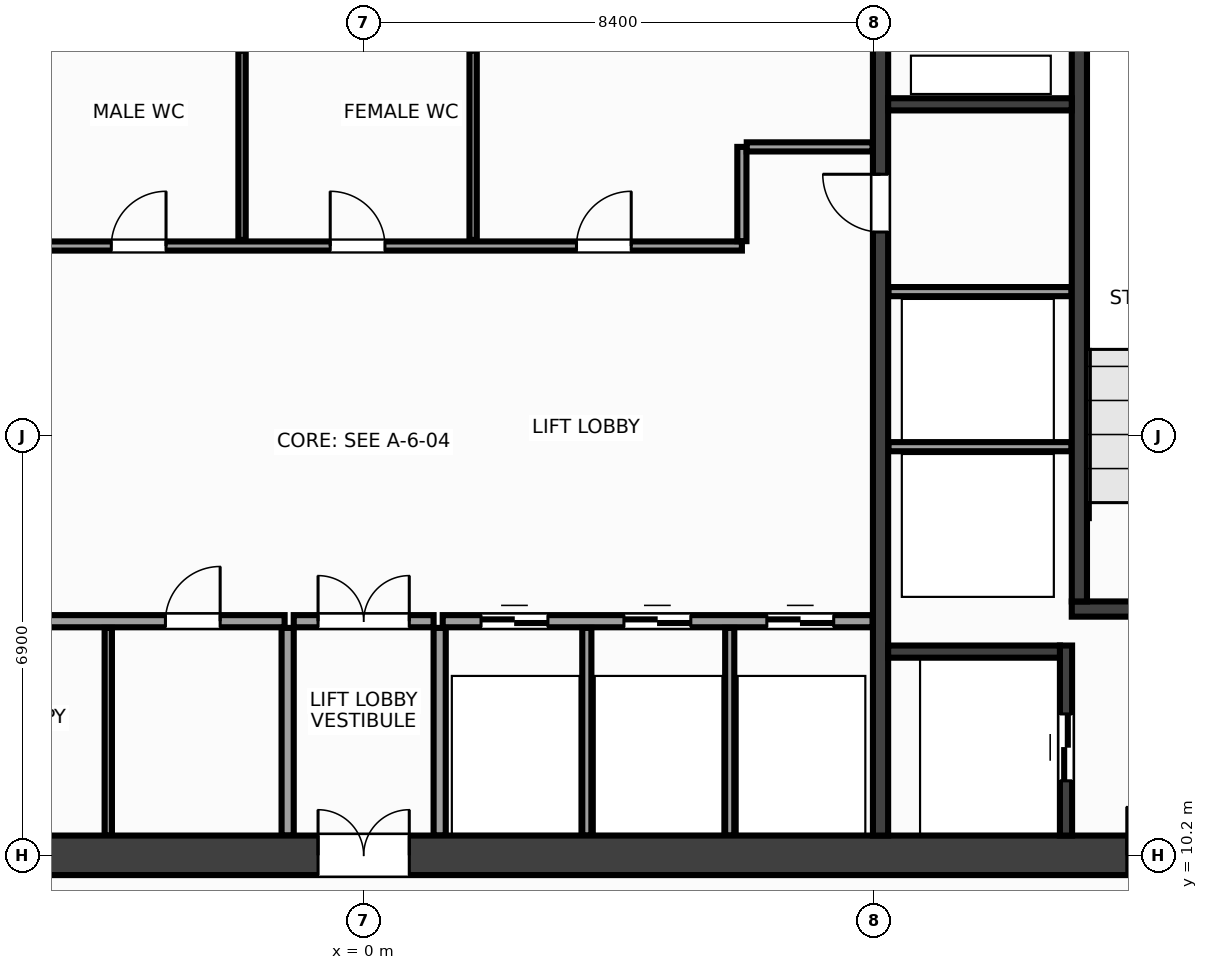
"""IFC4 building model, lengths in metres.
Left out: names, types, materials, properties, quantities, classifications, styles, units other than length and angle.
Written with IfcOpenShell. Run it as: python <this file> out.ifc"""

import sys

from ifc_helpers import new_model, si_unit, direction, frame, frame_2d, origin, place, context, subcontext, project, spatial, rectangle, extrude, source, transform, mapped, element, fill, save


model = new_model("IFC4")
c1 = context("Model", 3, precision=1e-05, world=origin(), true_north=direction((0.0, 1.0)))
c2 = subcontext(c1, "Body", "Model", "MODEL_VIEW")
j1 = project(units=[si_unit("LENGTHUNIT", "METRE"), si_unit("PLANEANGLEUNIT", "RADIAN")], contexts=[c1])
p1 = place(None, origin())
s1 = spatial("IfcSite", under=j1, at=p1, CompositionType="ELEMENT")
p2 = place(p1, origin())
s2 = spatial("IfcBuilding", under=s1, at=p2, CompositionType="ELEMENT")
p3 = place(p2, frame((0.0, 0.0, 113.6)))
s3 = spatial("IfcBuildingStorey", under=s2, at=p3, CompositionType="ELEMENT", Elevation=113.6)
m1 = source(origin(), c2, "Body", "SweptSolid", [
    extrude(rectangle(XDim=31.85, YDim=0.65, at=frame_2d((15.925, 0.0))), origin(), (0.0, 0.0, 1.0), 3.6),
])
p4 = place(p3, frame((-15.925, 10.2, 0.0), z_axis=(0.0, 0.0, 1.0), x_axis=(1.0, 0.0, 0.0)))
e1 = element("IfcWall", 1, at=p4, inside=s3, PredefinedType="SHEAR", context=c2, shape_type="MappedRepresentation", body=[
    mapped(m1, transform((0.0, 0.0, 0.0), x_axis=(1.0, 0.0, 0.0), y_axis=(0.0, 1.0, 0.0), z_axis=(0.0, 0.0, 1.0), scale=1.0)),
])
p5 = place(p4, frame((1.775, 0.0, 0.0)))
e2 = element("IfcOpeningElement", 2, at=p5, cuts=e1, PredefinedType="OPENING", context=c2, shape_type="SweptSolid", body=[
    extrude(rectangle(XDim=1.6, YDim=2.15, at=frame_2d((0.8, 1.075))), frame((0.0, 0.337, 0.0), z_axis=(0.0, -1.0, 0.0), x_axis=(1.0, 0.0, 0.0)), (0.0, 0.0, 1.0), 0.674),
])
p6 = place(p4, frame((28.475, 0.0, 0.0)))
e3 = element("IfcOpeningElement", 3, at=p6, cuts=e1, PredefinedType="OPENING", context=c2, shape_type="SweptSolid", body=[
    extrude(rectangle(XDim=1.6, YDim=2.15, at=frame_2d((0.8, 1.075))), frame((0.0, 0.337, 0.0), z_axis=(0.0, -1.0, 0.0), x_axis=(1.0, 0.0, 0.0)), (0.0, 0.0, 1.0), 0.674),
])
p7 = place(p4, frame((15.175, 0.0, 0.0)))
e4 = element("IfcOpeningElement", 4, at=p7, cuts=e1, PredefinedType="OPENING", context=c2, shape_type="SweptSolid", body=[
    extrude(rectangle(XDim=1.5, YDim=2.2, at=frame_2d((0.75, 1.1))), frame((0.0, 0.337, 0.0), z_axis=(0.0, -1.0, 0.0), x_axis=(1.0, 0.0, 0.0)), (0.0, 0.0, 1.0), 0.674),
])
m2 = source(origin(), c2, "Body", "SweptSolid", [
    extrude(rectangle(XDim=12.95, YDim=0.25, at=frame_2d((6.475, 0.0))), origin(), (0.0, 0.0, 1.0), 3.6),
])
p8 = place(p3, frame((8.5, 10.525, 0.0), z_axis=(0.0, 0.0, 1.0), x_axis=(0.0, 1.0, 0.0)))
e5 = element("IfcWall", 5, at=p8, inside=s3, PredefinedType="SHEAR", context=c2, shape_type="MappedRepresentation", body=[
    mapped(m2, transform((0.0, 0.0, 0.0), x_axis=(1.0, 0.0, 0.0), y_axis=(0.0, 1.0, 0.0), z_axis=(0.0, 0.0, 1.0), scale=1.0)),
])
p9 = place(p8, frame((9.925, 0.0, 0.0)))
e6 = element("IfcOpeningElement", 6, at=p9, cuts=e5, PredefinedType="OPENING", context=c2, shape_type="SweptSolid", body=[
    extrude(rectangle(XDim=0.95, YDim=2.15, at=frame_2d((0.475, 1.075))), frame((0.0, 0.137, 0.0), z_axis=(0.0, -1.0, 0.0), x_axis=(1.0, 0.0, 0.0)), (0.0, 0.0, 1.0), 0.274),
])
m3 = source(origin(), c2, "Body", "SweptSolid", [
    extrude(rectangle(XDim=3.63, YDim=0.25, at=frame_2d((1.815, 0.0))), origin(), (0.0, 0.0, 1.0), 3.6),
])
p10 = place(p3, frame((11.645, 14.25, 0.0), z_axis=(0.0, 0.0, 1.0), x_axis=(1.0, 0.0, 0.0)))
e7 = element("IfcWall", 7, at=p10, inside=s3, PredefinedType="SHEAR", context=c2, shape_type="MappedRepresentation", body=[
    mapped(m3, transform((0.0, 0.0, 0.0), x_axis=(1.0, 0.0, 0.0), y_axis=(0.0, 1.0, 0.0), z_axis=(0.0, 0.0, 1.0), scale=1.0)),
])
p11 = place(p10, frame((0.95, 0.0, 0.0)))
e8 = element("IfcOpeningElement", 8, at=p11, cuts=e7, PredefinedType="OPENING", context=c2, shape_type="SweptSolid", body=[
    extrude(rectangle(XDim=1.6, YDim=2.15, at=frame_2d((0.8, 1.075))), frame((0.0, 0.137, 0.0), z_axis=(0.0, -1.0, 0.0), x_axis=(1.0, 0.0, 0.0)), (0.0, 0.0, 1.0), 0.274),
])
m4 = source(origin(), c2, "Body", "SweptSolid", [
    extrude(rectangle(XDim=9.1, YDim=0.25, at=frame_2d((4.55, 0.0))), origin(), (0.0, 0.0, 1.0), 3.6),
])
p12 = place(p3, frame((11.77, 14.375, 0.0), z_axis=(0.0, 0.0, 1.0), x_axis=(0.0, 1.0, 0.0)))
e9 = element("IfcWall", 9, at=p12, inside=s3, PredefinedType="SHEAR", context=c2, shape_type="MappedRepresentation", body=[
    mapped(m4, transform((0.0, 0.0, 0.0), x_axis=(1.0, 0.0, 0.0), y_axis=(0.0, 1.0, 0.0), z_axis=(0.0, 0.0, 1.0), scale=1.0)),
])
m5 = source(origin(), c2, "Body", "SweptSolid", [
    extrude(rectangle(XDim=3.125, YDim=0.2, at=frame_2d((1.562, 0.0))), origin(), (0.0, 0.0, 1.0), 3.6),
])
p13 = place(p3, frame((11.55, 10.525, 0.0), z_axis=(0.0, 0.0, 1.0), x_axis=(0.0, 1.0, 0.0)))
e10 = element("IfcWall", 10, at=p13, inside=s3, PredefinedType="SHEAR", context=c2, shape_type="MappedRepresentation", body=[
    mapped(m5, transform((0.0, 0.0, 0.0), x_axis=(1.0, 0.0, 0.0), y_axis=(0.0, 1.0, 0.0), z_axis=(0.0, 0.0, 1.0), scale=1.0)),
])
p14 = place(p13, frame((0.9, 0.0, 0.0)))
e11 = element("IfcOpeningElement", 11, at=p14, cuts=e10, PredefinedType="OPENING", context=c2, shape_type="SweptSolid", body=[
    extrude(rectangle(XDim=1.1, YDim=2.15, at=frame_2d((0.55, 1.075))), frame((0.0, 0.112, 0.0), z_axis=(0.0, -1.0, 0.0), x_axis=(1.0, 0.0, 0.0)), (0.0, 0.0, 1.0), 0.224),
])
m6 = source(origin(), c2, "Body", "SweptSolid", [
    extrude(rectangle(XDim=2.825, YDim=0.2, at=frame_2d((1.413, 0.0))), origin(), (0.0, 0.0, 1.0), 3.6),
])
p15 = place(p3, frame((8.625, 13.55, 0.0), z_axis=(0.0, 0.0, 1.0), x_axis=(1.0, 0.0, 0.0)))
e12 = element("IfcWall", 12, at=p15, inside=s3, PredefinedType="SHEAR", context=c2, shape_type="MappedRepresentation", body=[
    mapped(m6, transform((0.0, 0.0, 0.0), x_axis=(1.0, 0.0, 0.0), y_axis=(0.0, 1.0, 0.0), z_axis=(0.0, 0.0, 1.0), scale=1.0)),
])
m7 = source(origin(), c2, "Body", "SweptSolid", [
    extrude(rectangle(XDim=3.02, YDim=0.2, at=frame_2d((1.51, 0.0))), origin(), (0.0, 0.0, 1.0), 3.6),
])
p16 = place(p3, frame((8.625, 22.55, 0.0), z_axis=(0.0, 0.0, 1.0), x_axis=(1.0, 0.0, 0.0)))
e13 = element("IfcWall", 13, at=p16, inside=s3, PredefinedType="SHEAR", context=c2, shape_type="MappedRepresentation", body=[
    mapped(m7, transform((0.0, 0.0, 0.0), x_axis=(1.0, 0.0, 0.0), y_axis=(0.0, 1.0, 0.0), z_axis=(0.0, 0.0, 1.0), scale=1.0)),
])
m8 = source(origin(), c2, "Body", "SweptSolid", [
    extrude(rectangle(XDim=3.01, YDim=0.15, at=frame_2d((1.505, 0.0))), origin(), (0.0, 0.0, 1.0), 3.36),
])
for number, where, z_axis, x_axis in (
    (14, (8.63, 16.92, 0.0), (0.0, 0.0, 1.0), (1.0, 0.0, 0.0)),
    (15, (8.63, 19.47, 0.0), (0.0, 0.0, 1.0), (1.0, 0.0, 0.0)),
):
    element("IfcWall", number, at=place(p3, frame(where, z_axis=z_axis, x_axis=x_axis)), inside=s3, PredefinedType="PARTITIONING", context=c2, shape_type="MappedRepresentation", body=[
        mapped(m8, transform((0.0, 0.0, 0.0), x_axis=(1.0, 0.0, 0.0), y_axis=(0.0, 1.0, 0.0), z_axis=(0.0, 0.0, 1.0), scale=1.0)),
    ])
m9 = source(origin(), c2, "Body", "SweptSolid", [
    extrude(rectangle(XDim=7.07, YDim=0.2, at=frame_2d((3.535, 0.0))), origin(), (0.0, 0.0, 1.0), 3.36),
])
p17 = place(p3, frame((-8.37, 14.05, 0.0), z_axis=(0.0, 0.0, 1.0), x_axis=(1.0, 0.0, 0.0)))
e16 = element("IfcWall", 16, at=p17, inside=s3, PredefinedType="PARTITIONING", context=c2, shape_type="MappedRepresentation", body=[
    mapped(m9, transform((0.0, 0.0, 0.0), x_axis=(1.0, 0.0, 0.0), y_axis=(0.0, 1.0, 0.0), z_axis=(0.0, 0.0, 1.0), scale=1.0)),
])
p18 = place(p17, frame((1.66, 0.0, 0.0)))
e17 = element("IfcOpeningElement", 17, at=p18, cuts=e16, PredefinedType="OPENING", context=c2, shape_type="SweptSolid", body=[
    extrude(rectangle(XDim=0.9, YDim=2.15, at=frame_2d((0.45, 1.075))), frame((0.0, 0.112, 0.0), z_axis=(0.0, -1.0, 0.0), x_axis=(1.0, 0.0, 0.0)), (0.0, 0.0, 1.0), 0.224),
])
p19 = place(p17, frame((5.11, 0.0, 0.0)))
e18 = element("IfcOpeningElement", 18, at=p19, cuts=e16, PredefinedType="OPENING", context=c2, shape_type="SweptSolid", body=[
    extrude(rectangle(XDim=0.9, YDim=2.15, at=frame_2d((0.45, 1.075))), frame((0.0, 0.112, 0.0), z_axis=(0.0, -1.0, 0.0), x_axis=(1.0, 0.0, 0.0)), (0.0, 0.0, 1.0), 0.224),
])
p20 = place(p3, frame((1.3, 14.05, 0.0), z_axis=(0.0, 0.0, 1.0), x_axis=(1.0, 0.0, 0.0)))
e19 = element("IfcWall", 19, at=p20, inside=s3, PredefinedType="PARTITIONING", context=c2, shape_type="MappedRepresentation", body=[
    mapped(m9, transform((0.0, 0.0, 0.0), x_axis=(1.0, 0.0, 0.0), y_axis=(0.0, 1.0, 0.0), z_axis=(0.0, 0.0, 1.0), scale=1.0)),
])
p21 = place(p20, frame((0.63, 0.0, 0.0)))
e20 = element("IfcOpeningElement", 20, at=p21, cuts=e19, PredefinedType="OPENING", context=c2, shape_type="SweptSolid", body=[
    extrude(rectangle(XDim=1.1, YDim=2.15, at=frame_2d((0.55, 1.075))), frame((0.0, 0.112, 0.0), z_axis=(0.0, -1.0, 0.0), x_axis=(1.0, 0.0, 0.0)), (0.0, 0.0, 1.0), 0.224),
])
p22 = place(p20, frame((2.98, 0.0, 0.0)))
e21 = element("IfcOpeningElement", 21, at=p22, cuts=e19, PredefinedType="OPENING", context=c2, shape_type="SweptSolid", body=[
    extrude(rectangle(XDim=1.1, YDim=2.15, at=frame_2d((0.55, 1.075))), frame((0.0, 0.112, 0.0), z_axis=(0.0, -1.0, 0.0), x_axis=(1.0, 0.0, 0.0)), (0.0, 0.0, 1.0), 0.224),
])
p23 = place(p20, frame((5.33, 0.0, 0.0)))
e22 = element("IfcOpeningElement", 22, at=p23, cuts=e19, PredefinedType="OPENING", context=c2, shape_type="SweptSolid", body=[
    extrude(rectangle(XDim=1.1, YDim=2.15, at=frame_2d((0.55, 1.075))), frame((0.0, 0.112, 0.0), z_axis=(0.0, -1.0, 0.0), x_axis=(1.0, 0.0, 0.0)), (0.0, 0.0, 1.0), 0.224),
])
m10 = source(origin(), c2, "Body", "SweptSolid", [
    extrude(rectangle(XDim=3.415, YDim=0.2, at=frame_2d((1.708, 0.0))), origin(), (0.0, 0.0, 1.0), 3.36),
])
for number, where, z_axis, x_axis in (
    (23, (-1.25, 10.525, 0.0), (0.0, 0.0, 1.0), (0.0, 1.0, 0.0)),
    (24, (1.25, 10.525, 0.0), (0.0, 0.0, 1.0), (0.0, 1.0, 0.0)),
):
    element("IfcWall", number, at=place(p3, frame(where, z_axis=z_axis, x_axis=x_axis)), inside=s3, PredefinedType="PARTITIONING", context=c2, shape_type="MappedRepresentation", body=[
        mapped(m10, transform((0.0, 0.0, 0.0), x_axis=(1.0, 0.0, 0.0), y_axis=(0.0, 1.0, 0.0), z_axis=(0.0, 0.0, 1.0), scale=1.0)),
    ])
m11 = source(origin(), c2, "Body", "SweptSolid", [
    extrude(rectangle(XDim=2.3, YDim=0.2, at=frame_2d((1.15, 0.0))), origin(), (0.0, 0.0, 1.0), 3.36),
])
p24 = place(p3, frame((-1.15, 14.05, 0.0), z_axis=(0.0, 0.0, 1.0), x_axis=(1.0, 0.0, 0.0)))
e25 = element("IfcWall", 25, at=p24, inside=s3, PredefinedType="PARTITIONING", context=c2, shape_type="MappedRepresentation", body=[
    mapped(m11, transform((0.0, 0.0, 0.0), x_axis=(1.0, 0.0, 0.0), y_axis=(0.0, 1.0, 0.0), z_axis=(0.0, 0.0, 1.0), scale=1.0)),
])
p25 = place(p24, frame((0.4, 0.0, 0.0)))
e26 = element("IfcOpeningElement", 26, at=p25, cuts=e25, PredefinedType="OPENING", context=c2, shape_type="SweptSolid", body=[
    extrude(rectangle(XDim=1.5, YDim=2.2, at=frame_2d((0.75, 1.1))), frame((0.0, 0.112, 0.0), z_axis=(0.0, -1.0, 0.0), x_axis=(1.0, 0.0, 0.0)), (0.0, 0.0, 1.0), 0.224),
])
m12 = source(origin(), c2, "Body", "SweptSolid", [
    extrude(rectangle(XDim=14.59, YDim=0.15, at=frame_2d((7.295, 0.0))), origin(), (0.0, 0.0, 1.0), 3.36),
])
p26 = place(p3, frame((-8.37, 20.22, 0.0), z_axis=(0.0, 0.0, 1.0), x_axis=(1.0, 0.0, 0.0)))
e27 = element("IfcWall", 27, at=p26, inside=s3, PredefinedType="PARTITIONING", context=c2, shape_type="MappedRepresentation", body=[
    mapped(m12, transform((0.0, 0.0, 0.0), x_axis=(1.0, 0.0, 0.0), y_axis=(0.0, 1.0, 0.0), z_axis=(0.0, 0.0, 1.0), scale=1.0)),
])
p27 = place(p26, frame((1.06, 0.0, 0.0)))
e28 = element("IfcOpeningElement", 28, at=p27, cuts=e27, PredefinedType="OPENING", context=c2, shape_type="SweptSolid", body=[
    extrude(rectangle(XDim=0.9, YDim=2.15, at=frame_2d((0.45, 1.075))), frame((0.0, 0.087, 0.0), z_axis=(0.0, -1.0, 0.0), x_axis=(1.0, 0.0, 0.0)), (0.0, 0.0, 1.0), 0.174),
])
p28 = place(p26, frame((4.22, 0.0, 0.0)))
e29 = element("IfcOpeningElement", 29, at=p28, cuts=e27, PredefinedType="OPENING", context=c2, shape_type="SweptSolid", body=[
    extrude(rectangle(XDim=0.9, YDim=2.15, at=frame_2d((0.45, 1.075))), frame((0.0, 0.087, 0.0), z_axis=(0.0, -1.0, 0.0), x_axis=(1.0, 0.0, 0.0)), (0.0, 0.0, 1.0), 0.174),
])
p29 = place(p26, frame((7.82, 0.0, 0.0)))
e30 = element("IfcOpeningElement", 30, at=p29, cuts=e27, PredefinedType="OPENING", context=c2, shape_type="SweptSolid", body=[
    extrude(rectangle(XDim=0.9, YDim=2.15, at=frame_2d((0.45, 1.075))), frame((0.0, 0.087, 0.0), z_axis=(0.0, -1.0, 0.0), x_axis=(1.0, 0.0, 0.0)), (0.0, 0.0, 1.0), 0.174),
])
p30 = place(p26, frame((11.87, 0.0, 0.0)))
e31 = element("IfcOpeningElement", 31, at=p30, cuts=e27, PredefinedType="OPENING", context=c2, shape_type="SweptSolid", body=[
    extrude(rectangle(XDim=0.9, YDim=2.15, at=frame_2d((0.45, 1.075))), frame((0.0, 0.087, 0.0), z_axis=(0.0, -1.0, 0.0), x_axis=(1.0, 0.0, 0.0)), (0.0, 0.0, 1.0), 0.174),
])
m13 = source(origin(), c2, "Body", "SweptSolid", [
    extrude(rectangle(XDim=1.55, YDim=0.15, at=frame_2d((0.775, 0.0))), origin(), (0.0, 0.0, 1.0), 3.36),
])
p31 = place(p3, frame((6.22, 20.3, 0.0), z_axis=(0.0, 0.0, 1.0), x_axis=(0.0, 1.0, 0.0)))
e32 = element("IfcWall", 32, at=p31, inside=s3, PredefinedType="PARTITIONING", context=c2, shape_type="MappedRepresentation", body=[
    mapped(m13, transform((0.0, 0.0, 0.0), x_axis=(1.0, 0.0, 0.0), y_axis=(0.0, 1.0, 0.0), z_axis=(0.0, 0.0, 1.0), scale=1.0)),
])
m14 = source(origin(), c2, "Body", "SweptSolid", [
    extrude(rectangle(XDim=2.07, YDim=0.15, at=frame_2d((1.035, 0.0))), origin(), (0.0, 0.0, 1.0), 3.36),
])
p32 = place(p3, frame((6.3, 21.85, 0.0), z_axis=(0.0, 0.0, 1.0), x_axis=(1.0, 0.0, 0.0)))
e33 = element("IfcWall", 33, at=p32, inside=s3, PredefinedType="PARTITIONING", context=c2, shape_type="MappedRepresentation", body=[
    mapped(m14, transform((0.0, 0.0, 0.0), x_axis=(1.0, 0.0, 0.0), y_axis=(0.0, 1.0, 0.0), z_axis=(0.0, 0.0, 1.0), scale=1.0)),
])
m15 = source(origin(), c2, "Body", "SweptSolid", [
    extrude(rectangle(XDim=3.415, YDim=0.12, at=frame_2d((1.708, 0.0))), origin(), (0.0, 0.0, 1.0), 3.36),
])
p33 = place(p3, frame((-4.2, 10.525, 0.0), z_axis=(0.0, 0.0, 1.0), x_axis=(0.0, 1.0, 0.0)))
e34 = element("IfcWall", 34, at=p33, inside=s3, PredefinedType="PARTITIONING", context=c2, shape_type="MappedRepresentation", body=[
    mapped(m15, transform((0.0, 0.0, 0.0), x_axis=(1.0, 0.0, 0.0), y_axis=(0.0, 1.0, 0.0), z_axis=(0.0, 0.0, 1.0), scale=1.0)),
])
m16 = source(origin(), c2, "Body", "SweptSolid", [
    extrude(rectangle(XDim=3.415, YDim=0.15, at=frame_2d((1.708, 0.0))), origin(), (0.0, 0.0, 1.0), 3.36),
])
for number, where, z_axis, x_axis in (
    (35, (3.67, 10.525, 0.0), (0.0, 0.0, 1.0), (0.0, 1.0, 0.0)),
    (36, (6.02, 10.525, 0.0), (0.0, 0.0, 1.0), (0.0, 1.0, 0.0)),
):
    element("IfcWall", number, at=place(p3, frame(where, z_axis=z_axis, x_axis=x_axis)), inside=s3, PredefinedType="PARTITIONING", context=c2, shape_type="MappedRepresentation", body=[
        mapped(m16, transform((0.0, 0.0, 0.0), x_axis=(1.0, 0.0, 0.0), y_axis=(0.0, 1.0, 0.0), z_axis=(0.0, 0.0, 1.0), scale=1.0)),
    ])
m17 = source(origin(), c2, "Body", "SweptSolid", [
    extrude(rectangle(XDim=3.115, YDim=0.12, at=frame_2d((1.558, 0.0))), origin(), (0.0, 0.0, 1.0), 3.36),
])
for number, where, z_axis, x_axis in (
    (37, (-2.0, 20.32, 0.0), (0.0, 0.0, 1.0), (0.0, 1.0, 0.0)),
    (38, (1.8, 20.32, 0.0), (0.0, 0.0, 1.0), (0.0, 1.0, 0.0)),
):
    element("IfcWall", number, at=place(p3, frame(where, z_axis=z_axis, x_axis=x_axis)), inside=s3, PredefinedType="PARTITIONING", context=c2, shape_type="MappedRepresentation", body=[
        mapped(m17, transform((0.0, 0.0, 0.0), x_axis=(1.0, 0.0, 0.0), y_axis=(0.0, 1.0, 0.0), z_axis=(0.0, 0.0, 1.0), scale=1.0)),
    ])
m18 = source(origin(), c2, "Body", "SweptSolid", [
    extrude(rectangle(XDim=1.6, YDim=2.15, at=frame_2d((0.8, 1.075))), frame((0.0, 0.025, 0.0), z_axis=(0.0, -1.0, 0.0), x_axis=(1.0, 0.0, 0.0)), (0.0, 0.0, 1.0), 0.05),
])
p34 = place(p6, origin())
e39 = element("IfcDoor", 39, at=p34, inside=s3, OperationType="DOUBLE_DOOR_SINGLE_SWING", PredefinedType="DOOR", context=c2, shape_type="MappedRepresentation", body=[
    mapped(m18, transform((0.0, 0.0, 0.0), x_axis=(1.0, 0.0, 0.0), y_axis=(0.0, 1.0, 0.0), z_axis=(0.0, 0.0, 1.0), scale=1.0)),
])
fill(e3, e39)
m19 = source(origin(), c2, "Body", "SweptSolid", [
    extrude(rectangle(XDim=1.1, YDim=2.15, at=frame_2d((0.55, 1.075))), frame((0.0, 0.025, 0.0), z_axis=(0.0, -1.0, 0.0), x_axis=(1.0, 0.0, 0.0)), (0.0, 0.0, 1.0), 0.05),
])
p35 = place(p14, origin())
e40 = element("IfcDoor", 40, at=p35, inside=s3, OperationType="DOUBLE_DOOR_SLIDING", PredefinedType="DOOR", context=c2, shape_type="MappedRepresentation", body=[
    mapped(m19, transform((0.0, 0.0, 0.0), x_axis=(1.0, 0.0, 0.0), y_axis=(0.0, 1.0, 0.0), z_axis=(0.0, 0.0, 1.0), scale=1.0)),
])
fill(e11, e40)
m20 = source(origin(), c2, "Body", "SweptSolid", [
    extrude(rectangle(XDim=0.95, YDim=2.15, at=frame_2d((0.475, 1.075))), frame((0.0, 0.025, 0.0), z_axis=(0.0, -1.0, 0.0), x_axis=(1.0, 0.0, 0.0)), (0.0, 0.0, 1.0), 0.05),
])
p36 = place(p9, origin())
e41 = element("IfcDoor", 41, at=p36, inside=s3, OperationType="SINGLE_SWING_RIGHT", PredefinedType="DOOR", context=c2, shape_type="MappedRepresentation", body=[
    mapped(m20, transform((0.0, 0.0, 0.0), x_axis=(1.0, 0.0, 0.0), y_axis=(0.0, 1.0, 0.0), z_axis=(0.0, 0.0, 1.0), scale=1.0)),
])
fill(e6, e41)
m21 = source(origin(), c2, "Body", "SweptSolid", [
    extrude(rectangle(XDim=0.9, YDim=2.15, at=frame_2d((0.45, 1.075))), frame((0.0, 0.025, 0.0), z_axis=(0.0, -1.0, 0.0), x_axis=(1.0, 0.0, 0.0)), (0.0, 0.0, 1.0), 0.05),
])
p37 = place(p19, origin())
e42 = element("IfcDoor", 42, at=p37, inside=s3, OperationType="SINGLE_SWING_RIGHT", PredefinedType="DOOR", context=c2, shape_type="MappedRepresentation", body=[
    mapped(m21, transform((0.0, 0.0, 0.0), x_axis=(1.0, 0.0, 0.0), y_axis=(0.0, 1.0, 0.0), z_axis=(0.0, 0.0, 1.0), scale=1.0)),
])
fill(e18, e42)
p38 = place(p21, origin())
e43 = element("IfcDoor", 43, at=p38, inside=s3, OperationType="DOUBLE_DOOR_SLIDING", PredefinedType="DOOR", context=c2, shape_type="MappedRepresentation", body=[
    mapped(m19, transform((0.0, 0.0, 0.0), x_axis=(1.0, 0.0, 0.0), y_axis=(0.0, 1.0, 0.0), z_axis=(0.0, 0.0, 1.0), scale=1.0)),
])
fill(e20, e43)
p39 = place(p22, origin())
e44 = element("IfcDoor", 44, at=p39, inside=s3, OperationType="DOUBLE_DOOR_SLIDING", PredefinedType="DOOR", context=c2, shape_type="MappedRepresentation", body=[
    mapped(m19, transform((0.0, 0.0, 0.0), x_axis=(1.0, 0.0, 0.0), y_axis=(0.0, 1.0, 0.0), z_axis=(0.0, 0.0, 1.0), scale=1.0)),
])
fill(e21, e44)
p40 = place(p23, origin())
e45 = element("IfcDoor", 45, at=p40, inside=s3, OperationType="DOUBLE_DOOR_SLIDING", PredefinedType="DOOR", context=c2, shape_type="MappedRepresentation", body=[
    mapped(m19, transform((0.0, 0.0, 0.0), x_axis=(1.0, 0.0, 0.0), y_axis=(0.0, 1.0, 0.0), z_axis=(0.0, 0.0, 1.0), scale=1.0)),
])
fill(e22, e45)
m22 = source(origin(), c2, "Body", "SweptSolid", [
    extrude(rectangle(XDim=1.5, YDim=2.2, at=frame_2d((0.75, 1.1))), frame((0.0, 0.025, 0.0), z_axis=(0.0, -1.0, 0.0), x_axis=(1.0, 0.0, 0.0)), (0.0, 0.0, 1.0), 0.05),
])
p41 = place(p25, origin())
e46 = element("IfcDoor", 46, at=p41, inside=s3, OperationType="DOUBLE_DOOR_SINGLE_SWING", PredefinedType="DOOR", context=c2, shape_type="MappedRepresentation", body=[
    mapped(m22, transform((0.0, 0.0, 0.0), x_axis=(1.0, 0.0, 0.0), y_axis=(0.0, 1.0, 0.0), z_axis=(0.0, 0.0, 1.0), scale=1.0)),
])
fill(e26, e46)
p42 = place(p7, origin())
e47 = element("IfcDoor", 47, at=p42, inside=s3, OperationType="DOUBLE_DOOR_SINGLE_SWING", PredefinedType="DOOR", context=c2, shape_type="MappedRepresentation", body=[
    mapped(m22, transform((0.0, 0.0, 0.0), x_axis=(1.0, 0.0, 0.0), y_axis=(0.0, 1.0, 0.0), z_axis=(0.0, 0.0, 1.0), scale=1.0)),
])
fill(e4, e47)
p43 = place(p28, origin())
e48 = element("IfcDoor", 48, at=p43, inside=s3, OperationType="SINGLE_SWING_RIGHT", PredefinedType="DOOR", context=c2, shape_type="MappedRepresentation", body=[
    mapped(m21, transform((0.0, 0.0, 0.0), x_axis=(1.0, 0.0, 0.0), y_axis=(0.0, 1.0, 0.0), z_axis=(0.0, 0.0, 1.0), scale=1.0)),
])
fill(e29, e48)
p44 = place(p29, origin())
e49 = element("IfcDoor", 49, at=p44, inside=s3, OperationType="SINGLE_SWING_LEFT", PredefinedType="DOOR", context=c2, shape_type="MappedRepresentation", body=[
    mapped(m21, transform((0.0, 0.0, 0.0), x_axis=(1.0, 0.0, 0.0), y_axis=(0.0, 1.0, 0.0), z_axis=(0.0, 0.0, 1.0), scale=1.0)),
])
fill(e30, e49)
p45 = place(p30, origin())
e50 = element("IfcDoor", 50, at=p45, inside=s3, OperationType="SINGLE_SWING_RIGHT", PredefinedType="DOOR", context=c2, shape_type="MappedRepresentation", body=[
    mapped(m21, transform((0.0, 0.0, 0.0), x_axis=(1.0, 0.0, 0.0), y_axis=(0.0, 1.0, 0.0), z_axis=(0.0, 0.0, 1.0), scale=1.0)),
])
fill(e31, e50)
save(model, sys.argv[1])
